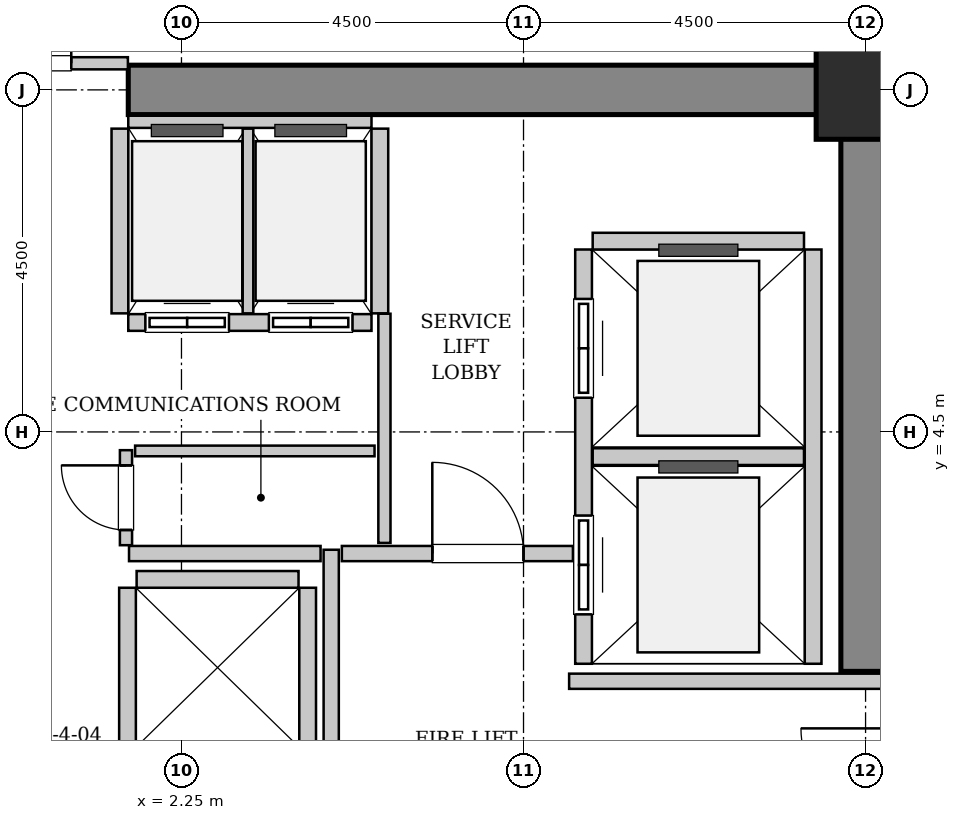
"""IFC4 building model, lengths in metres.
Left out: names, types, materials, properties, quantities, classifications, styles, units other than length and angle.
Written with IfcOpenShell. Run it as: python <this file> out.ifc"""

import sys

from ifc_helpers import new_model, si_unit, direction, frame, frame_2d, origin, origin_2d, place, context, subcontext, project, spatial, rectangle, hollow_rectangle, extrude, source, transform, mapped, element, fill, save


model = new_model("IFC4")
c1 = context("Model", 3, precision=1e-05, world=origin(), true_north=direction((0.0, 1.0)))
c2 = subcontext(c1, "Body", "Model", "MODEL_VIEW")
j1 = project(units=[si_unit("LENGTHUNIT", "METRE"), si_unit("PLANEANGLEUNIT", "RADIAN")], contexts=[c1])
p1 = place(None, origin())
s1 = spatial("IfcSite", under=j1, at=p1, CompositionType="ELEMENT")
p2 = place(p1, origin())
s2 = spatial("IfcBuilding", under=s1, at=p2, CompositionType="ELEMENT")
p3 = place(p2, frame((0.0, 0.0, 16.8)))
s3 = spatial("IfcBuildingStorey", under=s2, at=p3, CompositionType="ELEMENT", Elevation=16.8)
m1 = source(origin(), c2, "Body", "SweptSolid", [
    extrude(rectangle(XDim=10.025, YDim=0.65, at=frame_2d((5.012, 0.0))), origin(), (0.0, 0.0, 1.0), 5.4),
])
p4 = place(p3, frame((1.55, 9.0, 0.0), z_axis=(0.0, 0.0, 1.0), x_axis=(1.0, 0.0, 0.0)))
e1 = element("IfcWall", 1, at=p4, inside=s3, PredefinedType="SHEAR", context=c2, shape_type="MappedRepresentation", body=[
    mapped(m1, transform((0.0, 0.0, 0.0), x_axis=(1.0, 0.0, 0.0), y_axis=(0.0, 1.0, 0.0), z_axis=(0.0, 0.0, 1.0), scale=1.0)),
])
m2 = source(origin(), c2, "Body", "SweptSolid", [
    extrude(rectangle(XDim=7.325, YDim=0.65, at=frame_2d((3.663, 0.0))), origin(), (0.0, 0.0, 1.0), 5.4),
])
p5 = place(p3, frame((11.25, 1.35, 0.0), z_axis=(0.0, 0.0, 1.0), x_axis=(0.0, 1.0, 0.0)))
e2 = element("IfcWall", 2, at=p5, inside=s3, PredefinedType="SHEAR", context=c2, shape_type="MappedRepresentation", body=[
    mapped(m2, transform((0.0, 0.0, 0.0), x_axis=(1.0, 0.0, 0.0), y_axis=(0.0, 1.0, 0.0), z_axis=(0.0, 0.0, 1.0), scale=1.0)),
])
m3 = source(origin(), c2, "Body", "SweptSolid", [
    extrude(hollow_rectangle(XDim=1.3, YDim=1.3, WallThickness=0.065, InnerFilletRadius=0.065, OuterFilletRadius=0.13, at=origin_2d()), origin(), (0.0, 0.0, 1.0), 5.4),
])
p6 = place(p3, frame((11.25, 9.0, 0.0), z_axis=(0.0, 0.0, 1.0), x_axis=(1.0, 0.0, 0.0)))
e3 = element("IfcColumn", 3, at=p6, inside=s3, PredefinedType="COLUMN", context=c2, shape_type="MappedRepresentation", body=[
    mapped(m3, transform((0.0, 0.0, 0.0), x_axis=(1.0, 0.0, 0.0), y_axis=(0.0, 1.0, 0.0), z_axis=(0.0, 0.0, 1.0), scale=1.0)),
])
m4 = source(origin(), c2, "Body", "SweptSolid", [
    extrude(rectangle(XDim=5.45, YDim=0.22, at=frame_2d((2.725, 0.0))), origin(), (0.0, 0.0, 1.0), 5.085),
])
p7 = place(p3, frame((7.54, 6.9, 0.0), z_axis=(0.0, 0.0, 1.0), x_axis=(0.0, -1.0, 0.0)))
e4 = element("IfcWall", 4, at=p7, inside=s3, PredefinedType="SOLIDWALL", context=c2, shape_type="MappedRepresentation", body=[
    mapped(m4, transform((0.0, 0.0, 0.0), x_axis=(1.0, 0.0, 0.0), y_axis=(0.0, 1.0, 0.0), z_axis=(0.0, 0.0, 1.0), scale=1.0)),
])
p8 = place(p7, frame((3.5, 0.0, 0.0)))
e5 = element("IfcOpeningElement", 5, at=p8, cuts=e4, PredefinedType="OPENING", context=c2, shape_type="SweptSolid", body=[
    extrude(rectangle(XDim=1.3, YDim=2.3, at=frame_2d((0.65, 1.15))), frame((0.0, 0.12, 0.0), z_axis=(0.0, -1.0, 0.0), x_axis=(1.0, 0.0, 0.0)), (0.0, 0.0, 1.0), 0.24),
])
p9 = place(p7, frame((0.65, 0.0, 0.0)))
e6 = element("IfcOpeningElement", 6, at=p9, cuts=e4, PredefinedType="OPENING", context=c2, shape_type="SweptSolid", body=[
    extrude(rectangle(XDim=1.3, YDim=2.3, at=frame_2d((0.65, 1.15))), frame((0.0, 0.12, 0.0), z_axis=(0.0, -1.0, 0.0), x_axis=(1.0, 0.0, 0.0)), (0.0, 0.0, 1.0), 0.24),
])
p10 = place(p3, frame((10.56, 1.45, 0.0), z_axis=(0.0, 0.0, 1.0), x_axis=(0.0, 1.0, 0.0)))
e7 = element("IfcWall", 7, at=p10, inside=s3, PredefinedType="SOLIDWALL", context=c2, shape_type="MappedRepresentation", body=[
    mapped(m4, transform((0.0, 0.0, 0.0), x_axis=(1.0, 0.0, 0.0), y_axis=(0.0, 1.0, 0.0), z_axis=(0.0, 0.0, 1.0), scale=1.0)),
])
m5 = source(origin(), c2, "Body", "SweptSolid", [
    extrude(rectangle(XDim=2.78, YDim=0.22, at=frame_2d((1.39, 0.0))), origin(), (0.0, 0.0, 1.0), 5.085),
])
for number, where, z_axis, x_axis in (
    (8, (7.66, 4.175, 0.0), (0.0, 0.0, 1.0), (1.0, 0.0, 0.0)),
    (9, (10.44, 7.01, 0.0), (0.0, 0.0, 1.0), (-1.0, 0.0, 0.0)),
):
    element("IfcWall", number, at=place(p3, frame(where, z_axis=z_axis, x_axis=x_axis)), inside=s3, PredefinedType="SOLIDWALL", context=c2, shape_type="MappedRepresentation", body=[
        mapped(m5, transform((0.0, 0.0, 0.0), x_axis=(1.0, 0.0, 0.0), y_axis=(0.0, 1.0, 0.0), z_axis=(0.0, 0.0, 1.0), scale=1.0)),
    ])
m6 = source(origin(), c2, "Body", "SweptSolid", [
    extrude(rectangle(XDim=3.2, YDim=0.22, at=frame_2d((1.6, 0.0))), origin(), (0.0, 0.0, 1.0), 5.085),
])
p11 = place(p3, frame((1.55, 5.94, 0.0), z_axis=(0.0, 0.0, 1.0), x_axis=(1.0, 0.0, 0.0)))
e10 = element("IfcWall", 10, at=p11, inside=s3, PredefinedType="SOLIDWALL", context=c2, shape_type="MappedRepresentation", body=[
    mapped(m6, transform((0.0, 0.0, 0.0), x_axis=(1.0, 0.0, 0.0), y_axis=(0.0, 1.0, 0.0), z_axis=(0.0, 0.0, 1.0), scale=1.0)),
])
p12 = place(p11, frame((0.225, 0.0, 0.0)))
e11 = element("IfcOpeningElement", 11, at=p12, cuts=e10, PredefinedType="OPENING", context=c2, shape_type="SweptSolid", body=[
    extrude(rectangle(XDim=1.1, YDim=2.2, at=frame_2d((0.55, 1.1))), frame((0.0, 0.12, 0.0), z_axis=(0.0, -1.0, 0.0), x_axis=(1.0, 0.0, 0.0)), (0.0, 0.0, 1.0), 0.24),
])
p13 = place(p11, frame((1.85, 0.0, 0.0)))
e12 = element("IfcOpeningElement", 12, at=p13, cuts=e10, PredefinedType="OPENING", context=c2, shape_type="SweptSolid", body=[
    extrude(rectangle(XDim=1.1, YDim=2.2, at=frame_2d((0.55, 1.1))), frame((0.0, 0.12, 0.0), z_axis=(0.0, -1.0, 0.0), x_axis=(1.0, 0.0, 0.0)), (0.0, 0.0, 1.0), 0.24),
])
m7 = source(origin(), c2, "Body", "SweptSolid", [
    extrude(rectangle(XDim=3.2, YDim=0.16, at=frame_2d((1.6, 0.0))), origin(), (0.0, 0.0, 1.0), 3.975),
])
p14 = place(p3, frame((4.75, 8.58, 0.0), z_axis=(0.0, 0.0, 1.0), x_axis=(-1.0, 0.0, 0.0)))
e13 = element("IfcWall", 13, at=p14, inside=s3, PredefinedType="PARTITIONING", context=c2, shape_type="MappedRepresentation", body=[
    mapped(m7, transform((0.0, 0.0, 0.0), x_axis=(1.0, 0.0, 0.0), y_axis=(0.0, 1.0, 0.0), z_axis=(0.0, 0.0, 1.0), scale=1.0)),
])
m8 = source(origin(), c2, "Body", "SweptSolid", [
    extrude(rectangle(XDim=2.43, YDim=0.22, at=frame_2d((1.215, 0.0))), origin(), (0.0, 0.0, 1.0), 5.085),
])
p15 = place(p3, frame((1.44, 8.49, 0.0), z_axis=(0.0, 0.0, 1.0), x_axis=(0.0, -1.0, 0.0)))
e14 = element("IfcWall", 14, at=p15, inside=s3, PredefinedType="SOLIDWALL", context=c2, shape_type="MappedRepresentation", body=[
    mapped(m8, transform((0.0, 0.0, 0.0), x_axis=(1.0, 0.0, 0.0), y_axis=(0.0, 1.0, 0.0), z_axis=(0.0, 0.0, 1.0), scale=1.0)),
])
m9 = source(origin(), c2, "Body", "SweptSolid", [
    extrude(rectangle(XDim=2.43, YDim=0.14, at=frame_2d((1.215, 0.0))), origin(), (0.0, 0.0, 1.0), 5.085),
])
p16 = place(p3, frame((3.125, 6.06, 0.0), z_axis=(0.0, 0.0, 1.0), x_axis=(0.0, 1.0, 0.0)))
e15 = element("IfcWall", 15, at=p16, inside=s3, PredefinedType="PARTITIONING", context=c2, shape_type="MappedRepresentation", body=[
    mapped(m9, transform((0.0, 0.0, 0.0), x_axis=(1.0, 0.0, 0.0), y_axis=(0.0, 1.0, 0.0), z_axis=(0.0, 0.0, 1.0), scale=1.0)),
])
p17 = place(p3, frame((4.86, 6.06, 0.0), z_axis=(0.0, 0.0, 1.0), x_axis=(0.0, 1.0, 0.0)))
e16 = element("IfcWall", 16, at=p17, inside=s3, PredefinedType="SOLIDWALL", context=c2, shape_type="MappedRepresentation", body=[
    mapped(m8, transform((0.0, 0.0, 0.0), x_axis=(1.0, 0.0, 0.0), y_axis=(0.0, 1.0, 0.0), z_axis=(0.0, 0.0, 1.0), scale=1.0)),
])
m10 = source(origin(), c2, "Body", "SweptSolid", [
    extrude(rectangle(XDim=4.9, YDim=0.22, at=frame_2d((2.45, 0.0))), origin(), (0.0, 0.0, 1.0), 5.085),
])
for number, where, z_axis, x_axis in (
    (17, (1.54, 2.45, 0.0), (0.0, 0.0, 1.0), (0.0, -1.0, 0.0)),
    (18, (3.91, -2.45, 0.0), (0.0, 0.0, 1.0), (0.0, 1.0, 0.0)),
):
    element("IfcWall", number, at=place(p3, frame(where, z_axis=z_axis, x_axis=x_axis)), inside=s3, PredefinedType="SOLIDWALL", context=c2, shape_type="MappedRepresentation", body=[
        mapped(m10, transform((0.0, 0.0, 0.0), x_axis=(1.0, 0.0, 0.0), y_axis=(0.0, 1.0, 0.0), z_axis=(0.0, 0.0, 1.0), scale=1.0)),
    ])
m11 = source(origin(), c2, "Body", "SweptSolid", [
    extrude(rectangle(XDim=2.13, YDim=0.22, at=frame_2d((1.065, 0.0))), origin(), (0.0, 0.0, 1.0), 5.085),
])
p18 = place(p3, frame((3.79, 2.56, 0.0), z_axis=(0.0, 0.0, 1.0), x_axis=(-1.0, 0.0, 0.0)))
e19 = element("IfcWall", 19, at=p18, inside=s3, PredefinedType="SOLIDWALL", context=c2, shape_type="MappedRepresentation", body=[
    mapped(m11, transform((0.0, 0.0, 0.0), x_axis=(1.0, 0.0, 0.0), y_axis=(0.0, 1.0, 0.0), z_axis=(0.0, 0.0, 1.0), scale=1.0)),
])
m12 = source(origin(), c2, "Body", "SweptSolid", [
    extrude(rectangle(XDim=5.9, YDim=0.2, at=frame_2d((2.95, 0.0))), origin(), (0.0, 0.0, 1.0), 5.085),
])
p19 = place(p3, frame((4.22, -2.95, 0.0), z_axis=(0.0, 0.0, 1.0), x_axis=(0.0, 1.0, 0.0)))
e20 = element("IfcWall", 20, at=p19, inside=s3, PredefinedType="PARTITIONING", context=c2, shape_type="MappedRepresentation", body=[
    mapped(m12, transform((0.0, 0.0, 0.0), x_axis=(1.0, 0.0, 0.0), y_axis=(0.0, 1.0, 0.0), z_axis=(0.0, 0.0, 1.0), scale=1.0)),
])
m13 = source(origin(), c2, "Body", "SweptSolid", [
    extrude(rectangle(XDim=2.52, YDim=0.2, at=frame_2d((1.26, 0.0))), origin(), (0.0, 0.0, 1.0), 5.085),
])
p20 = place(p3, frame((1.56, 2.9, 0.0), z_axis=(0.0, 0.0, 1.0), x_axis=(1.0, 0.0, 0.0)))
e21 = element("IfcWall", 21, at=p20, inside=s3, PredefinedType="PARTITIONING", context=c2, shape_type="MappedRepresentation", body=[
    mapped(m13, transform((0.0, 0.0, 0.0), x_axis=(1.0, 0.0, 0.0), y_axis=(0.0, 1.0, 0.0), z_axis=(0.0, 0.0, 1.0), scale=1.0)),
])
m14 = source(origin(), c2, "Body", "SweptSolid", [
    extrude(rectangle(XDim=3.04, YDim=0.2, at=frame_2d((1.52, 0.0))), origin(), (0.0, 0.0, 1.0), 5.085),
])
p21 = place(p3, frame((4.36, 2.9, 0.0), z_axis=(0.0, 0.0, 1.0), x_axis=(1.0, 0.0, 0.0)))
e22 = element("IfcWall", 22, at=p21, inside=s3, PredefinedType="PARTITIONING", context=c2, shape_type="MappedRepresentation", body=[
    mapped(m14, transform((0.0, 0.0, 0.0), x_axis=(1.0, 0.0, 0.0), y_axis=(0.0, 1.0, 0.0), z_axis=(0.0, 0.0, 1.0), scale=1.0)),
])
p22 = place(p21, frame((1.19, 0.0, 0.0)))
e23 = element("IfcOpeningElement", 23, at=p22, cuts=e22, PredefinedType="OPENING", context=c2, shape_type="SweptSolid", body=[
    extrude(rectangle(XDim=1.2, YDim=2.15, at=frame_2d((0.6, 1.075))), frame((0.0, 0.11, 0.0), z_axis=(0.0, -1.0, 0.0), x_axis=(1.0, 0.0, 0.0)), (0.0, 0.0, 1.0), 0.22),
])
m15 = source(origin(), c2, "Body", "SweptSolid", [
    extrude(rectangle(XDim=4.11, YDim=0.2, at=frame_2d((2.055, 0.0))), origin(), (0.0, 0.0, 1.0), 5.085),
])
p23 = place(p3, frame((7.35, 1.22, 0.0), z_axis=(0.0, 0.0, 1.0), x_axis=(1.0, 0.0, 0.0)))
e24 = element("IfcWall", 24, at=p23, inside=s3, PredefinedType="PARTITIONING", context=c2, shape_type="MappedRepresentation", body=[
    mapped(m15, transform((0.0, 0.0, 0.0), x_axis=(1.0, 0.0, 0.0), y_axis=(0.0, 1.0, 0.0), z_axis=(0.0, 0.0, 1.0), scale=1.0)),
])
m16 = source(origin(), c2, "Body", "SweptSolid", [
    extrude(rectangle(XDim=3.09, YDim=0.16, at=frame_2d((1.545, 0.0))), origin(), (0.0, 0.0, 1.0), 3.975),
])
p24 = place(p3, frame((-1.545, 9.35, 0.0), z_axis=(0.0, 0.0, 1.0), x_axis=(1.0, 0.0, 0.0)))
e25 = element("IfcWall", 25, at=p24, inside=s3, PredefinedType="PARTITIONING", context=c2, shape_type="MappedRepresentation", body=[
    mapped(m16, transform((0.0, 0.0, 0.0), x_axis=(1.0, 0.0, 0.0), y_axis=(0.0, 1.0, 0.0), z_axis=(0.0, 0.0, 1.0), scale=1.0)),
])
p25 = place(p24, frame((0.745, 0.0, 0.0)))
e26 = element("IfcOpeningElement", 26, at=p25, cuts=e25, PredefinedType="OPENING", context=c2, shape_type="SweptSolid", body=[
    extrude(rectangle(XDim=1.6, YDim=2.3, at=frame_2d((0.8, 1.15))), frame((0.0, 0.09, 0.0), z_axis=(0.0, -1.0, 0.0), x_axis=(1.0, 0.0, 0.0)), (0.0, 0.0, 1.0), 0.18),
])
m17 = source(origin(), c2, "Body", "SweptSolid", [
    extrude(rectangle(XDim=3.015, YDim=0.16, at=frame_2d((1.507, 0.0))), origin(), (0.0, 0.0, 1.0), 5.085),
])
p26 = place(p3, frame((4.92, 3.04, 0.0), z_axis=(0.0, 0.0, 1.0), x_axis=(0.0, 1.0, 0.0)))
e27 = element("IfcWall", 27, at=p26, inside=s3, PredefinedType="PARTITIONING", context=c2, shape_type="MappedRepresentation", body=[
    mapped(m17, transform((0.0, 0.0, 0.0), x_axis=(1.0, 0.0, 0.0), y_axis=(0.0, 1.0, 0.0), z_axis=(0.0, 0.0, 1.0), scale=1.0)),
])
m18 = source(origin(), c2, "Body", "SweptSolid", [
    extrude(rectangle(XDim=1.25, YDim=0.16, at=frame_2d((0.625, 0.0))), origin(), (0.0, 0.0, 1.0), 5.085),
])
p27 = place(p3, frame((1.52, 3.01, 0.0), z_axis=(0.0, 0.0, 1.0), x_axis=(0.0, 1.0, 0.0)))
e28 = element("IfcWall", 28, at=p27, inside=s3, PredefinedType="PARTITIONING", context=c2, shape_type="MappedRepresentation", body=[
    mapped(m18, transform((0.0, 0.0, 0.0), x_axis=(1.0, 0.0, 0.0), y_axis=(0.0, 1.0, 0.0), z_axis=(0.0, 0.0, 1.0), scale=1.0)),
])
p28 = place(p27, frame((0.2, 0.0, 0.0)))
e29 = element("IfcOpeningElement", 29, at=p28, cuts=e28, PredefinedType="OPENING", context=c2, shape_type="SweptSolid", body=[
    extrude(rectangle(XDim=0.85, YDim=2.1, at=frame_2d((0.425, 1.05))), frame((0.0, 0.09, 0.0), z_axis=(0.0, -1.0, 0.0), x_axis=(1.0, 0.0, 0.0)), (0.0, 0.0, 1.0), 0.18),
])
m19 = source(origin(), c2, "Body", "SweptSolid", [
    extrude(rectangle(XDim=3.15, YDim=0.14, at=frame_2d((1.575, 0.0))), origin(), (0.0, 0.0, 1.0), 5.085),
])
p29 = place(p3, frame((1.64, 4.25, 0.0), z_axis=(0.0, 0.0, 1.0), x_axis=(1.0, 0.0, 0.0)))
e30 = element("IfcWall", 30, at=p29, inside=s3, PredefinedType="PARTITIONING", context=c2, shape_type="MappedRepresentation", body=[
    mapped(m19, transform((0.0, 0.0, 0.0), x_axis=(1.0, 0.0, 0.0), y_axis=(0.0, 1.0, 0.0), z_axis=(0.0, 0.0, 1.0), scale=1.0)),
])
m20 = source(origin(), c2, "Body", "SweptSolid", [
    extrude(rectangle(XDim=1.3, YDim=2.3, at=frame_2d((0.65, 1.15))), frame((0.0, 0.025, 0.0), z_axis=(0.0, -1.0, 0.0), x_axis=(1.0, 0.0, 0.0)), (0.0, 0.0, 1.0), 0.05),
])
p30 = place(p8, origin())
e31 = element("IfcDoor", 31, at=p30, inside=s3, OperationType="SLIDING_TO_RIGHT", PredefinedType="DOOR", context=c2, shape_type="MappedRepresentation", body=[
    mapped(m20, transform((0.0, 0.0, 0.0), x_axis=(1.0, 0.0, 0.0), y_axis=(0.0, 1.0, 0.0), z_axis=(0.0, 0.0, 1.0), scale=1.0)),
])
fill(e5, e31)
p31 = place(p9, origin())
e32 = element("IfcDoor", 32, at=p31, inside=s3, OperationType="SLIDING_TO_RIGHT", PredefinedType="DOOR", context=c2, shape_type="MappedRepresentation", body=[
    mapped(m20, transform((0.0, 0.0, 0.0), x_axis=(1.0, 0.0, 0.0), y_axis=(0.0, 1.0, 0.0), z_axis=(0.0, 0.0, 1.0), scale=1.0)),
])
fill(e6, e32)
m21 = source(origin(), c2, "Body", "SweptSolid", [
    extrude(rectangle(XDim=1.1, YDim=2.2, at=frame_2d((0.55, 1.1))), frame((0.0, 0.025, 0.0), z_axis=(0.0, -1.0, 0.0), x_axis=(1.0, 0.0, 0.0)), (0.0, 0.0, 1.0), 0.05),
])
p32 = place(p12, origin())
e33 = element("IfcDoor", 33, at=p32, inside=s3, OperationType="DOUBLE_DOOR_SLIDING", PredefinedType="DOOR", context=c2, shape_type="MappedRepresentation", body=[
    mapped(m21, transform((0.0, 0.0, 0.0), x_axis=(1.0, 0.0, 0.0), y_axis=(0.0, 1.0, 0.0), z_axis=(0.0, 0.0, 1.0), scale=1.0)),
])
fill(e11, e33)
p33 = place(p13, origin())
e34 = element("IfcDoor", 34, at=p33, inside=s3, OperationType="DOUBLE_DOOR_SLIDING", PredefinedType="DOOR", context=c2, shape_type="MappedRepresentation", body=[
    mapped(m21, transform((0.0, 0.0, 0.0), x_axis=(1.0, 0.0, 0.0), y_axis=(0.0, 1.0, 0.0), z_axis=(0.0, 0.0, 1.0), scale=1.0)),
])
fill(e12, e34)
m22 = source(origin(), c2, "Body", "SweptSolid", [
    extrude(rectangle(XDim=1.2, YDim=2.15, at=frame_2d((0.6, 1.075))), frame((0.0, 0.025, 0.0), z_axis=(0.0, -1.0, 0.0), x_axis=(1.0, 0.0, 0.0)), (0.0, 0.0, 1.0), 0.05),
])
p34 = place(p22, origin())
e35 = element("IfcDoor", 35, at=p34, inside=s3, OperationType="SINGLE_SWING_LEFT", PredefinedType="DOOR", context=c2, shape_type="MappedRepresentation", body=[
    mapped(m22, transform((0.0, 0.0, 0.0), x_axis=(1.0, 0.0, 0.0), y_axis=(0.0, 1.0, 0.0), z_axis=(0.0, 0.0, 1.0), scale=1.0)),
])
fill(e23, e35)
m23 = source(origin(), c2, "Body", "SweptSolid", [
    extrude(rectangle(XDim=1.6, YDim=2.3, at=frame_2d((0.8, 1.15))), frame((0.0, 0.025, 0.0), z_axis=(0.0, -1.0, 0.0), x_axis=(1.0, 0.0, 0.0)), (0.0, 0.0, 1.0), 0.05),
])
p35 = place(p25, origin())
e36 = element("IfcDoor", 36, at=p35, inside=s3, OperationType="DOUBLE_DOOR_SINGLE_SWING", PredefinedType="DOOR", context=c2, shape_type="MappedRepresentation", body=[
    mapped(m23, transform((0.0, 0.0, 0.0), x_axis=(1.0, 0.0, 0.0), y_axis=(0.0, 1.0, 0.0), z_axis=(0.0, 0.0, 1.0), scale=1.0)),
])
fill(e26, e36)
m24 = source(origin(), c2, "Body", "SweptSolid", [
    extrude(rectangle(XDim=0.85, YDim=2.1, at=frame_2d((0.425, 1.05))), frame((0.0, 0.025, 0.0), z_axis=(0.0, -1.0, 0.0), x_axis=(1.0, 0.0, 0.0)), (0.0, 0.0, 1.0), 0.05),
])
p36 = place(p28, origin())
e37 = element("IfcDoor", 37, at=p36, inside=s3, OperationType="SINGLE_SWING_RIGHT", PredefinedType="DOOR", context=c2, shape_type="MappedRepresentation", body=[
    mapped(m24, transform((0.0, 0.0, 0.0), x_axis=(1.0, 0.0, 0.0), y_axis=(0.0, 1.0, 0.0), z_axis=(0.0, 0.0, 1.0), scale=1.0)),
])
fill(e29, e37)
save(model, sys.argv[1])
